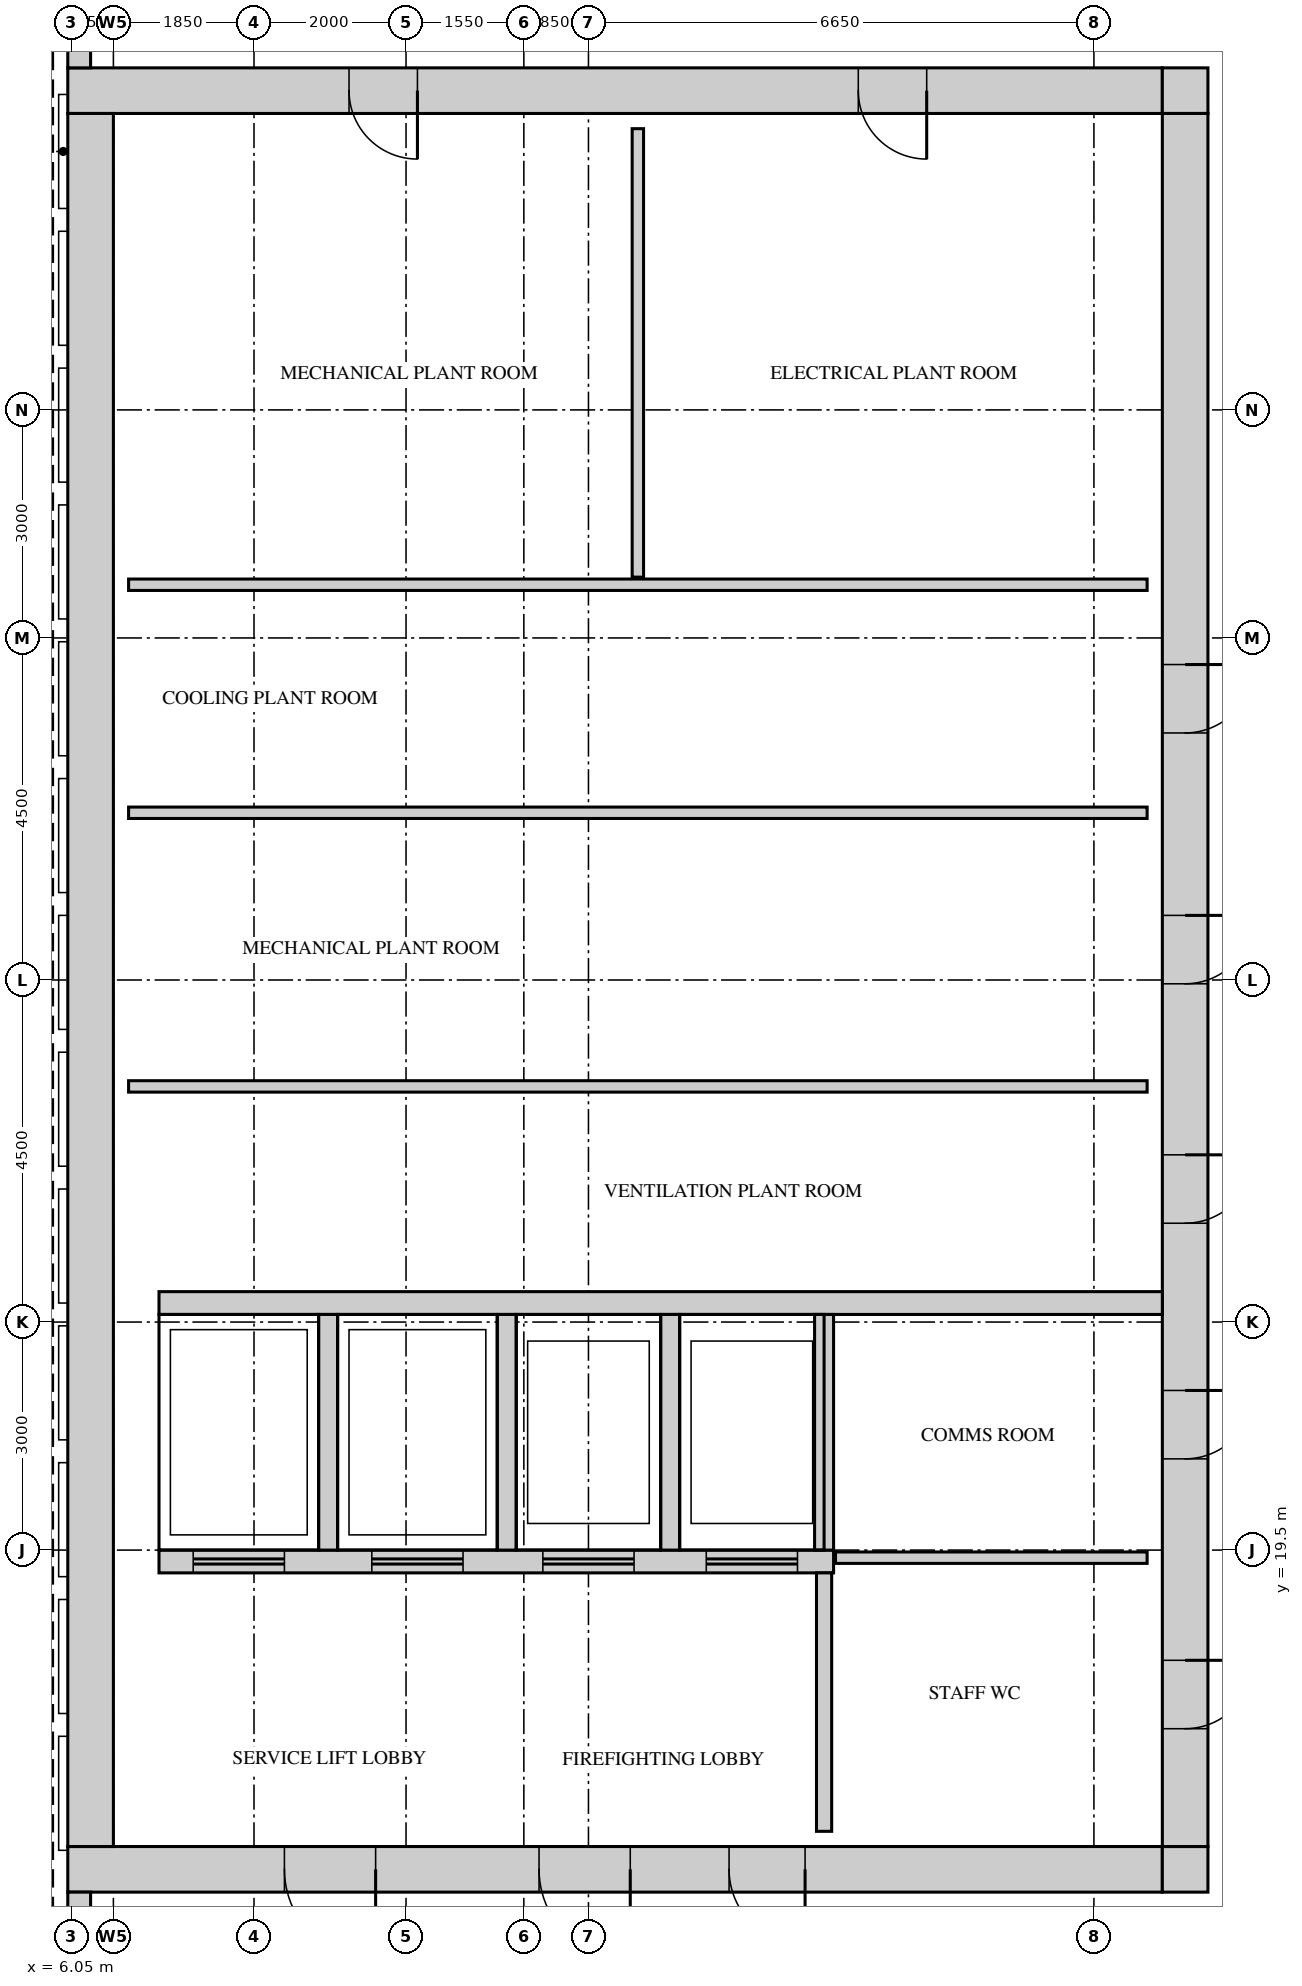
"""IFC4 building model, lengths in metres.
Left out: names, types, materials, properties, quantities, classifications, styles, units other than length and angle.
Written with IfcOpenShell. Run it as: python <this file> out.ifc"""

import sys

from ifc_helpers import new_model, si_unit, direction, frame, frame_2d, origin, place, context, subcontext, project, spatial, rectangle, extrude, source, transform, mapped, element, fill, save


model = new_model("IFC4")
c1 = context("Model", 3, precision=1e-05, world=origin(), true_north=direction((0.0, 1.0)))
c2 = subcontext(c1, "Body", "Model", "MODEL_VIEW")
j1 = project(units=[si_unit("LENGTHUNIT", "METRE"), si_unit("PLANEANGLEUNIT", "RADIAN")], contexts=[c1])
p1 = place(None, origin())
s1 = spatial("IfcSite", under=j1, at=p1, CompositionType="ELEMENT")
p2 = place(p1, origin())
s2 = spatial("IfcBuilding", under=s1, at=p2, CompositionType="ELEMENT")
p3 = place(p2, frame((0.0, 0.0, 339.2)))
s3 = spatial("IfcBuildingStorey", under=s2, at=p3, CompositionType="ELEMENT", Elevation=339.2)
m1 = source(origin(), c2, "Body", "SweptSolid", [
    extrude(rectangle(XDim=14.4, YDim=0.6, at=frame_2d((7.2, 0.0))), origin(), (0.0, 0.0, 1.0), 4.25),
])
p4 = place(p3, frame((6.0, 38.7, 0.0), z_axis=(0.0, 0.0, 1.0), x_axis=(1.0, 0.0, 0.0)))
e1 = element("IfcWall", 1, at=p4, inside=s3, PredefinedType="SHEAR", context=c2, shape_type="MappedRepresentation", body=[
    mapped(m1, transform((0.0, 0.0, 0.0))),
])
m2 = source(origin(), c2, "Body", "SweptSolid", [
    extrude(rectangle(XDim=0.9, YDim=2.1, at=frame_2d((0.45, 1.05))), frame((0.0, 0.31, 0.0), z_axis=(0.0, -1.0, 0.0), x_axis=(1.0, 0.0, 0.0)), (0.0, 0.0, 1.0), 0.62),
])
p5 = place(p4, frame((3.7, 0.0, 0.0)))
e2 = element("IfcOpeningElement", 2, at=p5, cuts=e1, PredefinedType="OPENING", context=c2, shape_type="MappedRepresentation", body=[
    mapped(m2, transform((0.0, 0.0, 0.0))),
])
p6 = place(p4, frame((10.4, 0.0, 0.0)))
e3 = element("IfcOpeningElement", 3, at=p6, cuts=e1, PredefinedType="OPENING", context=c2, shape_type="MappedRepresentation", body=[
    mapped(m2, transform((0.0, 0.0, 0.0))),
])
m3 = source(origin(), c2, "Body", "SweptSolid", [
    extrude(rectangle(XDim=0.6, YDim=0.6, at=frame_2d((0.3, 0.0))), origin(), (0.0, 0.0, 1.0), 4.25),
])
p7 = place(p3, frame((20.4, 38.7, 0.0), z_axis=(0.0, 0.0, 1.0), x_axis=(1.0, 0.0, 0.0)))
e4 = element("IfcWall", 4, at=p7, inside=s3, PredefinedType="SHEAR", context=c2, shape_type="MappedRepresentation", body=[
    mapped(m3, transform((0.0, 0.0, 0.0))),
])
p8 = place(p3, frame((6.0, 15.3, 0.0), z_axis=(0.0, 0.0, 1.0), x_axis=(1.0, 0.0, 0.0)))
e5 = element("IfcWall", 5, at=p8, inside=s3, PredefinedType="SHEAR", context=c2, shape_type="MappedRepresentation", body=[
    mapped(m1, transform((0.0, 0.0, 0.0))),
])
m4 = source(origin(), c2, "Body", "SweptSolid", [
    extrude(rectangle(XDim=1.2, YDim=2.1, at=frame_2d((0.6, 1.05))), frame((0.0, 0.31, 0.0), z_axis=(0.0, -1.0, 0.0), x_axis=(1.0, 0.0, 0.0)), (0.0, 0.0, 1.0), 0.62),
])
p9 = place(p8, frame((6.2, 0.0, 0.0)))
e6 = element("IfcOpeningElement", 6, at=p9, cuts=e5, PredefinedType="OPENING", context=c2, shape_type="MappedRepresentation", body=[
    mapped(m4, transform((0.0, 0.0, 0.0))),
])
p10 = place(p8, frame((2.85, 0.0, 0.0)))
e7 = element("IfcOpeningElement", 7, at=p10, cuts=e5, PredefinedType="OPENING", context=c2, shape_type="MappedRepresentation", body=[
    mapped(m4, transform((0.0, 0.0, 0.0))),
])
m5 = source(origin(), c2, "Body", "SweptSolid", [
    extrude(rectangle(XDim=1.0, YDim=2.1, at=frame_2d((0.5, 1.05))), frame((0.0, 0.31, 0.0), z_axis=(0.0, -1.0, 0.0), x_axis=(1.0, 0.0, 0.0)), (0.0, 0.0, 1.0), 0.62),
])
p11 = place(p8, frame((8.7, 0.0, 0.0)))
e8 = element("IfcOpeningElement", 8, at=p11, cuts=e5, PredefinedType="OPENING", context=c2, shape_type="MappedRepresentation", body=[
    mapped(m5, transform((0.0, 0.0, 0.0))),
])
p12 = place(p3, frame((20.4, 15.3, 0.0), z_axis=(0.0, 0.0, 1.0), x_axis=(1.0, 0.0, 0.0)))
e9 = element("IfcWall", 9, at=p12, inside=s3, PredefinedType="SHEAR", context=c2, shape_type="MappedRepresentation", body=[
    mapped(m3, transform((0.0, 0.0, 0.0))),
])
m6 = source(origin(), c2, "Body", "SweptSolid", [
    extrude(rectangle(XDim=22.8, YDim=0.6, at=frame_2d((11.4, 0.0))), origin(), (0.0, 0.0, 1.0), 4.25),
])
p13 = place(p3, frame((20.7, 15.6, 0.0), z_axis=(0.0, 0.0, 1.0), x_axis=(0.0, 1.0, 0.0)))
e10 = element("IfcWall", 10, at=p13, inside=s3, PredefinedType="SHEAR", context=c2, shape_type="MappedRepresentation", body=[
    mapped(m6, transform((0.0, 0.0, 0.0))),
])
p14 = place(p13, frame((8.2, 0.0, 0.0)))
e11 = element("IfcOpeningElement", 11, at=p14, cuts=e10, PredefinedType="OPENING", context=c2, shape_type="MappedRepresentation", body=[
    mapped(m2, transform((0.0, 0.0, 0.0))),
])
p15 = place(p13, frame((11.35, 0.0, 0.0)))
e12 = element("IfcOpeningElement", 12, at=p15, cuts=e10, PredefinedType="OPENING", context=c2, shape_type="MappedRepresentation", body=[
    mapped(m2, transform((0.0, 0.0, 0.0))),
])
p16 = place(p13, frame((14.65, 0.0, 0.0)))
e13 = element("IfcOpeningElement", 13, at=p16, cuts=e10, PredefinedType="OPENING", context=c2, shape_type="MappedRepresentation", body=[
    mapped(m2, transform((0.0, 0.0, 0.0))),
])
p17 = place(p13, frame((1.55, 0.0, 0.0)))
e14 = element("IfcOpeningElement", 14, at=p17, cuts=e10, PredefinedType="OPENING", context=c2, shape_type="MappedRepresentation", body=[
    mapped(m2, transform((0.0, 0.0, 0.0))),
])
p18 = place(p13, frame((5.1, 0.0, 0.0)))
e15 = element("IfcOpeningElement", 15, at=p18, cuts=e10, PredefinedType="OPENING", context=c2, shape_type="MappedRepresentation", body=[
    mapped(m2, transform((0.0, 0.0, 0.0))),
])
p19 = place(p3, frame((6.3, 15.6, 0.0), z_axis=(0.0, 0.0, 1.0), x_axis=(0.0, 1.0, 0.0)))
e16 = element("IfcWall", 16, at=p19, inside=s3, PredefinedType="SHEAR", context=c2, shape_type="MappedRepresentation", body=[
    mapped(m6, transform((0.0, 0.0, 0.0))),
])
m7 = source(origin(), c2, "Body", "SweptSolid", [
    extrude(rectangle(XDim=13.2, YDim=0.3, at=frame_2d((6.6, 0.0))), origin(), (0.0, 0.0, 1.0), 4.25),
])
p20 = place(p3, frame((7.2, 22.75, 0.0), z_axis=(0.0, 0.0, 1.0), x_axis=(1.0, 0.0, 0.0)))
e17 = element("IfcWall", 17, at=p20, inside=s3, PredefinedType="STANDARD", context=c2, shape_type="MappedRepresentation", body=[
    mapped(m7, transform((0.0, 0.0, 0.0))),
])
m8 = source(origin(), c2, "Body", "SweptSolid", [
    extrude(rectangle(XDim=8.875, YDim=0.3, at=frame_2d((4.438, 0.0))), origin(), (0.0, 0.0, 1.0), 4.25),
])
p21 = place(p3, frame((7.2, 19.35, 0.0), z_axis=(0.0, 0.0, 1.0), x_axis=(1.0, 0.0, 0.0)))
e18 = element("IfcWall", 18, at=p21, inside=s3, PredefinedType="STANDARD", context=c2, shape_type="MappedRepresentation", body=[
    mapped(m8, transform((0.0, 0.0, 0.0))),
])
m9 = source(origin(), c2, "Body", "SweptSolid", [
    extrude(rectangle(XDim=1.2, YDim=2.1, at=frame_2d((0.6, 1.05))), frame((0.0, 0.16, 0.0), z_axis=(0.0, -1.0, 0.0), x_axis=(1.0, 0.0, 0.0)), (0.0, 0.0, 1.0), 0.32),
])
p22 = place(p21, frame((0.45, 0.0, 0.0)))
e19 = element("IfcOpeningElement", 19, at=p22, cuts=e18, PredefinedType="OPENING", context=c2, shape_type="MappedRepresentation", body=[
    mapped(m9, transform((0.0, 0.0, 0.0))),
])
p23 = place(p21, frame((2.8, 0.0, 0.0)))
e20 = element("IfcOpeningElement", 20, at=p23, cuts=e18, PredefinedType="OPENING", context=c2, shape_type="MappedRepresentation", body=[
    mapped(m9, transform((0.0, 0.0, 0.0))),
])
p24 = place(p21, frame((5.05, 0.0, 0.0)))
e21 = element("IfcOpeningElement", 21, at=p24, cuts=e18, PredefinedType="OPENING", context=c2, shape_type="MappedRepresentation", body=[
    mapped(m9, transform((0.0, 0.0, 0.0))),
])
p25 = place(p21, frame((7.2, 0.0, 0.0)))
e22 = element("IfcOpeningElement", 22, at=p25, cuts=e18, PredefinedType="OPENING", context=c2, shape_type="MappedRepresentation", body=[
    mapped(m9, transform((0.0, 0.0, 0.0))),
])
m10 = source(origin(), c2, "Body", "SweptSolid", [
    extrude(rectangle(XDim=3.1, YDim=0.25, at=frame_2d((1.55, 0.0))), origin(), (0.0, 0.0, 1.0), 4.25),
])
for number, where, z_axis, x_axis in (
    (23, (9.425, 19.5, 0.0), (0.0, 0.0, 1.0), (0.0, 1.0, 0.0)),
    (24, (11.775, 19.5, 0.0), (0.0, 0.0, 1.0), (0.0, 1.0, 0.0)),
    (25, (13.925, 19.5, 0.0), (0.0, 0.0, 1.0), (0.0, 1.0, 0.0)),
    (26, (15.95, 19.5, 0.0), (0.0, 0.0, 1.0), (0.0, 1.0, 0.0)),
):
    element("IfcWall", number, at=place(p3, frame(where, z_axis=z_axis, x_axis=x_axis)), inside=s3, PredefinedType="STANDARD", context=c2, shape_type="MappedRepresentation", body=[
        mapped(m10, transform((0.0, 0.0, 0.0))),
    ])
m11 = source(origin(), c2, "Body", "SweptSolid", [
    extrude(rectangle(XDim=2.7, YDim=0.3, at=frame_2d((1.35, 0.0))), origin(), (0.0, 0.0, 1.0), 4.5),
])
p26 = place(p3, frame((6.15, 41.7, 0.0), z_axis=(0.0, 0.0, 1.0), x_axis=(0.0, -1.0, 0.0)))
e27 = element("IfcWall", 27, at=p26, inside=s3, PredefinedType="SOLIDWALL", context=c2, shape_type="MappedRepresentation", body=[
    mapped(m11, transform((0.0, 0.0, 0.0))),
])
m12 = source(origin(), c2, "Body", "SweptSolid", [
    extrude(rectangle(XDim=1.2, YDim=2.4, at=frame_2d((0.6, 1.2))), frame((0.0, 0.16, 0.0), z_axis=(0.0, -1.0, 0.0), x_axis=(1.0, 0.0, 0.0)), (0.0, 0.0, 1.0), 0.32),
])
p27 = place(p26, frame((0.75, 0.0, 0.9)))
e28 = element("IfcOpeningElement", 28, at=p27, cuts=e27, PredefinedType="OPENING", context=c2, shape_type="MappedRepresentation", body=[
    mapped(m12, transform((0.0, 0.0, 0.0))),
])
m13 = source(origin(), c2, "Body", "SweptSolid", [
    extrude(rectangle(XDim=3.0, YDim=0.3, at=frame_2d((1.5, 0.0))), origin(), (0.0, 0.0, 1.0), 4.5),
])
p28 = place(p3, frame((6.15, 15.0, 0.0), z_axis=(0.0, 0.0, 1.0), x_axis=(0.0, -1.0, 0.0)))
e29 = element("IfcWall", 29, at=p28, inside=s3, PredefinedType="SOLIDWALL", context=c2, shape_type="MappedRepresentation", body=[
    mapped(m13, transform((0.0, 0.0, 0.0))),
])
p29 = place(p28, frame((0.9, 0.0, 0.9)))
e30 = element("IfcOpeningElement", 30, at=p29, cuts=e29, PredefinedType="OPENING", context=c2, shape_type="MappedRepresentation", body=[
    mapped(m12, transform((0.0, 0.0, 0.0))),
])
m14 = source(origin(), c2, "Body", "SweptSolid", [
    extrude(rectangle(XDim=3.4, YDim=0.2, at=frame_2d((1.7, 0.0))), origin(), (0.0, 0.0, 1.0), 4.3),
])
p30 = place(p3, frame((15.95, 15.8, 0.0), z_axis=(0.0, 0.0, 1.0), x_axis=(0.0, 1.0, 0.0)))
e31 = element("IfcWall", 31, at=p30, inside=s3, PredefinedType="PARTITIONING", context=c2, shape_type="MappedRepresentation", body=[
    mapped(m14, transform((0.0, 0.0, 0.0))),
])
m15 = source(origin(), c2, "Body", "SweptSolid", [
    extrude(rectangle(XDim=4.1, YDim=0.15, at=frame_2d((2.05, 0.0))), origin(), (0.0, 0.0, 1.0), 4.3),
])
p31 = place(p3, frame((16.1, 19.4, 0.0), z_axis=(0.0, 0.0, 1.0), x_axis=(1.0, 0.0, 0.0)))
e32 = element("IfcWall", 32, at=p31, inside=s3, PredefinedType="PARTITIONING", context=c2, shape_type="MappedRepresentation", body=[
    mapped(m15, transform((0.0, 0.0, 0.0))),
])
m16 = source(origin(), c2, "Body", "SweptSolid", [
    extrude(rectangle(XDim=13.4, YDim=0.15, at=frame_2d((6.7, 0.0))), origin(), (0.0, 0.0, 1.0), 4.3),
])
for number, where, z_axis, x_axis in (
    (33, (6.8, 25.6, 0.0), (0.0, 0.0, 1.0), (1.0, 0.0, 0.0)),
    (34, (6.8, 29.2, 0.0), (0.0, 0.0, 1.0), (1.0, 0.0, 0.0)),
    (35, (6.8, 32.2, 0.0), (0.0, 0.0, 1.0), (1.0, 0.0, 0.0)),
):
    element("IfcWall", number, at=place(p3, frame(where, z_axis=z_axis, x_axis=x_axis)), inside=s3, PredefinedType="PARTITIONING", context=c2, shape_type="MappedRepresentation", body=[
        mapped(m16, transform((0.0, 0.0, 0.0))),
    ])
m17 = source(origin(), c2, "Body", "SweptSolid", [
    extrude(rectangle(XDim=5.9, YDim=0.15, at=frame_2d((2.95, 0.0))), origin(), (0.0, 0.0, 1.0), 4.3),
])
p32 = place(p3, frame((13.5, 32.3, 0.0), z_axis=(0.0, 0.0, 1.0), x_axis=(0.0, 1.0, 0.0)))
e36 = element("IfcWall", 36, at=p32, inside=s3, PredefinedType="PARTITIONING", context=c2, shape_type="MappedRepresentation", body=[
    mapped(m17, transform((0.0, 0.0, 0.0))),
])
m18 = source(origin(), c2, "Body", "SweptSolid", [
    extrude(rectangle(XDim=0.9, YDim=2.1, at=frame_2d((0.45, 1.05))), frame((0.0, 0.25, 0.0), z_axis=(0.0, -1.0, 0.0), x_axis=(1.0, 0.0, 0.0)), (0.0, 0.0, 1.0), 0.5),
])
p33 = place(p14, origin())
e37 = element("IfcDoor", 37, at=p33, inside=s3, OperationType="SINGLE_SWING_RIGHT", PredefinedType="DOOR", context=c2, shape_type="MappedRepresentation", body=[
    mapped(m18, transform((0.0, 0.0, 0.0))),
])
fill(e11, e37)
p34 = place(p15, origin())
e38 = element("IfcDoor", 38, at=p34, inside=s3, OperationType="SINGLE_SWING_RIGHT", PredefinedType="DOOR", context=c2, shape_type="MappedRepresentation", body=[
    mapped(m18, transform((0.0, 0.0, 0.0))),
])
fill(e12, e38)
p35 = place(p16, origin())
e39 = element("IfcDoor", 39, at=p35, inside=s3, OperationType="SINGLE_SWING_RIGHT", PredefinedType="DOOR", context=c2, shape_type="MappedRepresentation", body=[
    mapped(m18, transform((0.0, 0.0, 0.0))),
])
fill(e13, e39)
p36 = place(p5, origin())
e40 = element("IfcDoor", 40, at=p36, inside=s3, OperationType="SINGLE_SWING_RIGHT", PredefinedType="DOOR", context=c2, shape_type="MappedRepresentation", body=[
    mapped(m18, transform((0.0, 0.0, 0.0))),
])
fill(e2, e40)
p37 = place(p6, origin())
e41 = element("IfcDoor", 41, at=p37, inside=s3, OperationType="SINGLE_SWING_RIGHT", PredefinedType="DOOR", context=c2, shape_type="MappedRepresentation", body=[
    mapped(m18, transform((0.0, 0.0, 0.0))),
])
fill(e3, e41)
p38 = place(p17, origin())
e42 = element("IfcDoor", 42, at=p38, inside=s3, OperationType="SINGLE_SWING_RIGHT", PredefinedType="DOOR", context=c2, shape_type="MappedRepresentation", body=[
    mapped(m18, transform((0.0, 0.0, 0.0))),
])
fill(e14, e42)
p39 = place(p18, origin())
e43 = element("IfcDoor", 43, at=p39, inside=s3, OperationType="SINGLE_SWING_RIGHT", PredefinedType="DOOR", context=c2, shape_type="MappedRepresentation", body=[
    mapped(m18, transform((0.0, 0.0, 0.0))),
])
fill(e15, e43)
m19 = source(origin(), c2, "Body", "SweptSolid", [
    extrude(rectangle(XDim=1.2, YDim=2.1, at=frame_2d((0.6, 1.05))), frame((0.0, 0.25, 0.0), z_axis=(0.0, -1.0, 0.0), x_axis=(1.0, 0.0, 0.0)), (0.0, 0.0, 1.0), 0.5),
])
p40 = place(p9, origin())
e44 = element("IfcDoor", 44, at=p40, inside=s3, OperationType="SINGLE_SWING_RIGHT", PredefinedType="DOOR", context=c2, shape_type="MappedRepresentation", body=[
    mapped(m19, transform((0.0, 0.0, 0.0))),
])
fill(e6, e44)
p41 = place(p10, origin())
e45 = element("IfcDoor", 45, at=p41, inside=s3, OperationType="SINGLE_SWING_RIGHT", PredefinedType="DOOR", context=c2, shape_type="MappedRepresentation", body=[
    mapped(m19, transform((0.0, 0.0, 0.0))),
])
fill(e7, e45)
m20 = source(origin(), c2, "Body", "SweptSolid", [
    extrude(rectangle(XDim=1.0, YDim=2.1, at=frame_2d((0.5, 1.05))), frame((0.0, 0.25, 0.0), z_axis=(0.0, -1.0, 0.0), x_axis=(1.0, 0.0, 0.0)), (0.0, 0.0, 1.0), 0.5),
])
p42 = place(p11, origin())
e46 = element("IfcDoor", 46, at=p42, inside=s3, OperationType="SINGLE_SWING_RIGHT", PredefinedType="DOOR", context=c2, shape_type="MappedRepresentation", body=[
    mapped(m20, transform((0.0, 0.0, 0.0))),
])
fill(e8, e46)
m21 = source(origin(), c2, "Body", "SweptSolid", [
    extrude(rectangle(XDim=1.2, YDim=2.1, at=frame_2d((0.6, 1.05))), frame((0.0, 0.025, 0.0), z_axis=(0.0, -1.0, 0.0), x_axis=(1.0, 0.0, 0.0)), (0.0, 0.0, 1.0), 0.05),
])
p43 = place(p22, origin())
e47 = element("IfcDoor", 47, at=p43, inside=s3, OperationType="DOUBLE_DOOR_SLIDING", PredefinedType="DOOR", context=c2, shape_type="MappedRepresentation", body=[
    mapped(m21, transform((0.0, 0.0, 0.0))),
])
fill(e19, e47)
p44 = place(p23, origin())
e48 = element("IfcDoor", 48, at=p44, inside=s3, OperationType="DOUBLE_DOOR_SLIDING", PredefinedType="DOOR", context=c2, shape_type="MappedRepresentation", body=[
    mapped(m21, transform((0.0, 0.0, 0.0))),
])
fill(e20, e48)
p45 = place(p24, origin())
e49 = element("IfcDoor", 49, at=p45, inside=s3, OperationType="DOUBLE_DOOR_SLIDING", PredefinedType="DOOR", context=c2, shape_type="MappedRepresentation", body=[
    mapped(m21, transform((0.0, 0.0, 0.0))),
])
fill(e21, e49)
p46 = place(p25, origin())
e50 = element("IfcDoor", 50, at=p46, inside=s3, OperationType="DOUBLE_DOOR_SLIDING", PredefinedType="DOOR", context=c2, shape_type="MappedRepresentation", body=[
    mapped(m21, transform((0.0, 0.0, 0.0))),
])
fill(e22, e50)
save(model, sys.argv[1])
